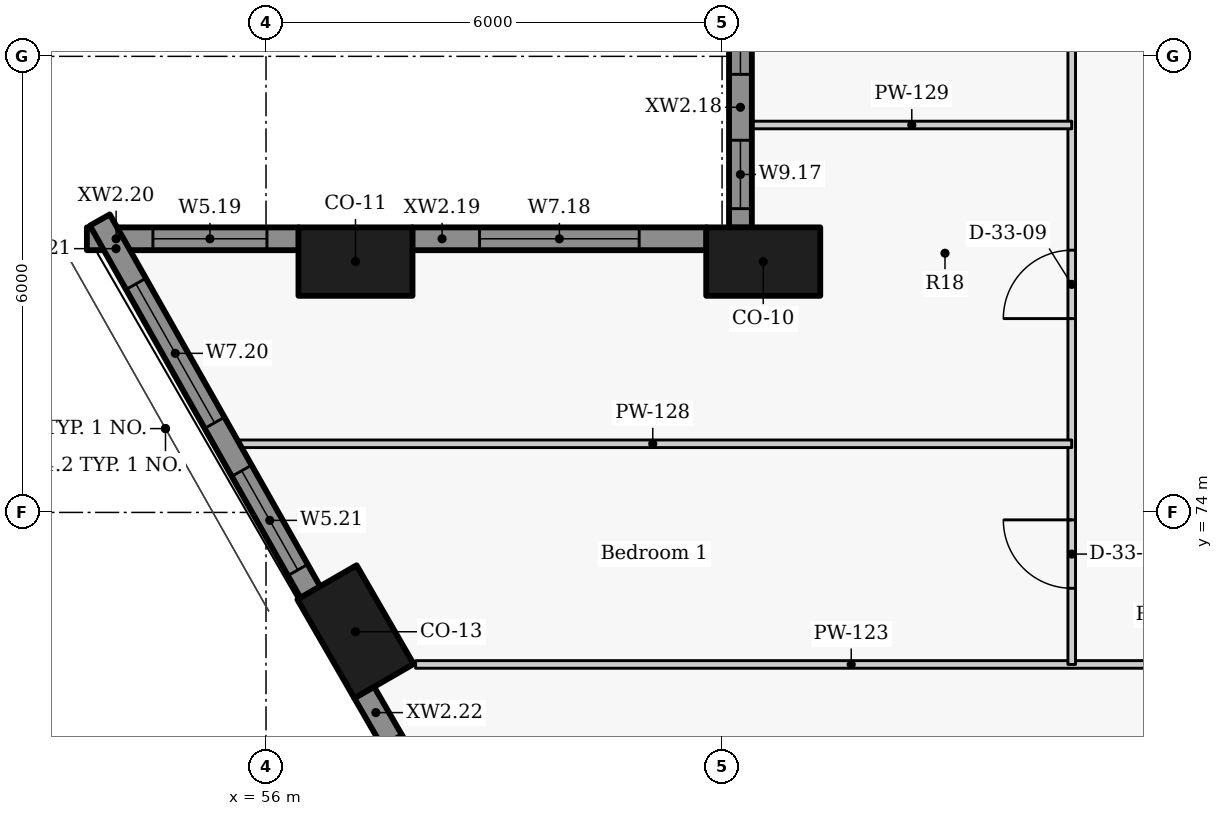
"""IFC4 building model, lengths in metres.
Left out: names, types, materials, properties, quantities, classifications, styles, units other than length and angle.
Written with IfcOpenShell. Run it as: python <this file> out.ifc"""

import sys

from ifc_helpers import new_model, si_unit, direction, frame, frame_2d, origin, origin_2d, place, context, subcontext, project, spatial, rectangle, extrude, element, fill, save


model = new_model("IFC4")
c1 = context("Model", 3, precision=1e-05, world=origin(), true_north=direction((0.0, 1.0)))
c2 = subcontext(c1, "Body", "Model", "MODEL_VIEW")
j1 = project(units=[si_unit("LENGTHUNIT", "METRE"), si_unit("PLANEANGLEUNIT", "RADIAN")], contexts=[c1])
p1 = place(None, origin())
s1 = spatial("IfcSite", under=j1, at=p1, CompositionType="ELEMENT")
p2 = place(p1, origin())
s2 = spatial("IfcBuilding", under=s1, at=p2, CompositionType="ELEMENT")
p3 = place(p2, frame((0.0, 0.0, 51.3)))
s3 = spatial("IfcBuildingStorey", under=s2, at=p3, CompositionType="ELEMENT", Elevation=51.3)
for number, where, z_axis, x_axis in (
    (1, (62.542, 77.3, 0.0), (0.0, 0.0, 1.0), (-1.0, 0.0, 0.0)),
    (2, (57.177, 77.3, 0.0), (0.0, 0.0, 1.0), (-1.0, 0.0, 0.0)),
    (3, (57.177, 72.43, 0.0), (0.0, 0.0, 1.0), (0.5, -0.866, 0.0)),
):
    element("IfcColumn", number, at=place(p3, frame(where, z_axis=z_axis, x_axis=x_axis)), inside=s3, PredefinedType="COLUMN", context=c2, shape_type="SweptSolid", body=[
        extrude(rectangle(XDim=1.5, YDim=0.9, at=origin_2d()), origin(), (0.0, 0.0, 1.0), 3.3),
    ])
p4 = place(p3, frame((62.242, 81.954, 0.0), z_axis=(0.0, 0.0, 1.0), x_axis=(0.0, -1.0, 0.0)))
e4 = element("IfcWall", 4, at=p4, inside=s3, PredefinedType="SOLIDWALL", context=c2, shape_type="SweptSolid", body=[
    extrude(rectangle(XDim=4.208, YDim=0.3, at=frame_2d((2.104, 0.0))), origin(), (0.0, 0.0, 1.0), 2.425),
])
p5 = place(p4, frame((0.691, 0.0, 0.9)))
e5 = element("IfcOpeningElement", 5, at=p5, cuts=e4, PredefinedType="OPENING", context=c2, shape_type="SweptSolid", body=[
    extrude(rectangle(XDim=1.5, YDim=1.1, at=frame_2d((0.75, 0.55))), frame((0.0, 0.16, 0.0), z_axis=(0.0, -1.0, 0.0), x_axis=(1.0, 0.0, 0.0)), (0.0, 0.0, 1.0), 0.32),
])
p6 = place(p4, frame((3.058, 0.0, 0.9)))
e6 = element("IfcOpeningElement", 6, at=p6, cuts=e4, PredefinedType="OPENING", context=c2, shape_type="SweptSolid", body=[
    extrude(rectangle(XDim=0.9, YDim=1.1, at=frame_2d((0.45, 0.55))), frame((0.0, 0.16, 0.0), z_axis=(0.0, -1.0, 0.0), x_axis=(1.0, 0.0, 0.0)), (0.0, 0.0, 1.0), 0.32),
])
p7 = place(p3, frame((61.796, 77.6, 0.0), z_axis=(0.0, 0.0, 1.0), x_axis=(-1.0, 0.0, 0.0)))
e7 = element("IfcWall", 7, at=p7, inside=s3, PredefinedType="SOLIDWALL", context=c2, shape_type="SweptSolid", body=[
    extrude(rectangle(XDim=3.873, YDim=0.3, at=frame_2d((1.936, 0.0))), origin(), (0.0, 0.0, 1.0), 2.425),
])
p8 = place(p7, frame((0.886, 0.0, 0.9)))
e8 = element("IfcOpeningElement", 8, at=p8, cuts=e7, PredefinedType="OPENING", context=c2, shape_type="SweptSolid", body=[
    extrude(rectangle(XDim=2.1, YDim=1.1, at=frame_2d((1.05, 0.55))), frame((0.0, 0.16, 0.0), z_axis=(0.0, -1.0, 0.0), x_axis=(1.0, 0.0, 0.0)), (0.0, 0.0, 1.0), 0.32),
])
p9 = place(p3, frame((56.431, 77.6, 0.0), z_axis=(0.0, 0.0, 1.0), x_axis=(-1.0, 0.0, 0.0)))
e9 = element("IfcWall", 9, at=p9, inside=s3, PredefinedType="SOLIDWALL", context=c2, shape_type="SweptSolid", body=[
    extrude(rectangle(XDim=2.788, YDim=0.3, at=frame_2d((1.394, 0.0))), origin(), (0.0, 0.0, 1.0), 2.425),
])
p10 = place(p9, frame((0.419, 0.0, 0.9)))
e10 = element("IfcOpeningElement", 10, at=p10, cuts=e9, PredefinedType="OPENING", context=c2, shape_type="SweptSolid", body=[
    extrude(rectangle(XDim=1.5, YDim=1.1, at=frame_2d((0.75, 0.55))), frame((0.0, 0.16, 0.0), z_axis=(0.0, -1.0, 0.0), x_axis=(1.0, 0.0, 0.0)), (0.0, 0.0, 1.0), 0.32),
])
p11 = place(p3, frame((53.814, 77.847, 0.0), z_axis=(0.0, 0.0, 1.0), x_axis=(0.492363204642, -0.870389840655, 0.0)))
e11 = element("IfcWall", 11, at=p11, inside=s3, PredefinedType="SOLIDWALL", context=c2, shape_type="SweptSolid", body=[
    extrude(rectangle(XDim=5.626, YDim=0.3, at=frame_2d((2.813, 0.0))), origin(), (0.0, 0.0, 1.0), 2.425),
])
p12 = place(p11, frame((0.965, 0.0, 0.9)))
e12 = element("IfcOpeningElement", 12, at=p12, cuts=e11, PredefinedType="OPENING", context=c2, shape_type="SweptSolid", body=[
    extrude(rectangle(XDim=2.1, YDim=1.1, at=frame_2d((1.05, 0.55))), frame((0.0, 0.16, 0.0), z_axis=(0.0, -1.0, 0.0), x_axis=(1.0, 0.0, 0.0)), (0.0, 0.0, 1.0), 0.32),
])
p13 = place(p11, frame((3.789, 0.0, 0.9)))
e13 = element("IfcOpeningElement", 13, at=p13, cuts=e11, PredefinedType="OPENING", context=c2, shape_type="SweptSolid", body=[
    extrude(rectangle(XDim=1.5, YDim=1.1, at=frame_2d((0.75, 0.55))), frame((0.0, 0.16, 0.0), z_axis=(0.0, -1.0, 0.0), x_axis=(1.0, 0.0, 0.0)), (0.0, 0.0, 1.0), 0.32),
])
p14 = place(p3, frame((57.29, 71.634, 0.0), z_axis=(0.0, 0.0, 1.0), x_axis=(0.499977402622, -0.866038449993, 0.0)))
e14 = element("IfcWall", 14, at=p14, inside=s3, PredefinedType="SOLIDWALL", context=c2, shape_type="SweptSolid", body=[
    extrude(rectangle(XDim=3.537, YDim=0.3, at=frame_2d((1.769, 0.0))), origin(), (0.0, 0.0, 1.0), 2.425),
])
p15 = place(p14, frame((0.719, 0.0, 0.9)))
e15 = element("IfcOpeningElement", 15, at=p15, cuts=e14, PredefinedType="OPENING", context=c2, shape_type="SweptSolid", body=[
    extrude(rectangle(XDim=2.1, YDim=1.1, at=frame_2d((1.05, 0.55))), frame((0.0, 0.16, 0.0), z_axis=(0.0, -1.0, 0.0), x_axis=(1.0, 0.0, 0.0)), (0.0, 0.0, 1.0), 0.32),
])
p16 = place(p3, frame((57.968, 72.0, 0.0), z_axis=(0.0, 0.0, 1.0), x_axis=(1.0, 0.0, 0.0)))
e16 = element("IfcWall", 16, at=p16, inside=s3, PredefinedType="PARTITIONING", context=c2, shape_type="SweptSolid", body=[
    extrude(rectangle(XDim=11.462, YDim=0.1, at=frame_2d((5.731, 0.0))), origin(), (0.0, 0.0, 1.0), 3.025),
])
p17 = place(p3, frame((66.6, 72.0, 0.0), z_axis=(0.0, 0.0, 1.0), x_axis=(0.0, 1.0, 0.0)))
e17 = element("IfcWall", 17, at=p17, inside=s3, PredefinedType="PARTITIONING", context=c2, shape_type="SweptSolid", body=[
    extrude(rectangle(XDim=18.0, YDim=0.1, at=frame_2d((9.0, 0.0))), origin(), (0.0, 0.0, 1.0), 3.025),
])
p18 = place(p17, frame((1.002, 0.0, 0.0)))
e18 = element("IfcOpeningElement", 18, at=p18, cuts=e17, PredefinedType="OPENING", context=c2, shape_type="SweptSolid", body=[
    extrude(rectangle(XDim=0.9, YDim=2.1, at=frame_2d((0.45, 1.05))), frame((0.0, 0.06, 0.0), z_axis=(0.0, -1.0, 0.0), x_axis=(1.0, 0.0, 0.0)), (0.0, 0.0, 1.0), 0.12),
])
p19 = place(p17, frame((4.55, 0.0, 0.0)))
e19 = element("IfcOpeningElement", 19, at=p19, cuts=e17, PredefinedType="OPENING", context=c2, shape_type="SweptSolid", body=[
    extrude(rectangle(XDim=0.9, YDim=2.1, at=frame_2d((0.45, 1.05))), frame((0.0, 0.06, 0.0), z_axis=(0.0, -1.0, 0.0), x_axis=(1.0, 0.0, 0.0)), (0.0, 0.0, 1.0), 0.12),
])
p20 = place(p17, frame((8.098, 0.0, 0.0)))
e20 = element("IfcOpeningElement", 20, at=p20, cuts=e17, PredefinedType="OPENING", context=c2, shape_type="SweptSolid", body=[
    extrude(rectangle(XDim=0.9, YDim=2.1, at=frame_2d((0.45, 1.05))), frame((0.0, 0.06, 0.0), z_axis=(0.0, -1.0, 0.0), x_axis=(1.0, 0.0, 0.0)), (0.0, 0.0, 1.0), 0.12),
])
p21 = place(p17, frame((13.55, 0.0, 0.0)))
e21 = element("IfcOpeningElement", 21, at=p21, cuts=e17, PredefinedType="OPENING", context=c2, shape_type="SweptSolid", body=[
    extrude(rectangle(XDim=0.9, YDim=2.1, at=frame_2d((0.45, 1.05))), frame((0.0, 0.06, 0.0), z_axis=(0.0, -1.0, 0.0), x_axis=(1.0, 0.0, 0.0)), (0.0, 0.0, 1.0), 0.12),
])
p22 = place(p3, frame((55.576, 74.903, 0.0), z_axis=(0.0, 0.0, 1.0), x_axis=(1.0, 0.0, 0.0)))
e22 = element("IfcWall", 22, at=p22, inside=s3, PredefinedType="PARTITIONING", context=c2, shape_type="SweptSolid", body=[
    extrude(rectangle(XDim=11.024, YDim=0.1, at=frame_2d((5.512, 0.0))), origin(), (0.0, 0.0, 1.0), 2.405),
])
p23 = place(p3, frame((62.392, 79.097, 0.0), z_axis=(0.0, 0.0, 1.0), x_axis=(1.0, 0.0, 0.0)))
e23 = element("IfcWall", 23, at=p23, inside=s3, PredefinedType="PARTITIONING", context=c2, shape_type="SweptSolid", body=[
    extrude(rectangle(XDim=4.208, YDim=0.1, at=frame_2d((2.104, 0.0))), origin(), (0.0, 0.0, 1.0), 2.405),
])
p24 = place(p5, origin())
e24 = element("IfcWindow", 24, at=p24, inside=s3, PartitioningType="SINGLE_PANEL", PredefinedType="WINDOW", context=c2, shape_type="SweptSolid", body=[
    extrude(rectangle(XDim=1.5, YDim=1.1, at=frame_2d((0.75, 0.55))), frame((0.0, 0.03, 0.0), z_axis=(0.0, -1.0, 0.0), x_axis=(1.0, 0.0, 0.0)), (0.0, 0.0, 1.0), 0.06),
])
fill(e5, e24)
p25 = place(p6, origin())
e25 = element("IfcWindow", 25, at=p25, inside=s3, PartitioningType="SINGLE_PANEL", PredefinedType="WINDOW", context=c2, shape_type="SweptSolid", body=[
    extrude(rectangle(XDim=0.9, YDim=1.1, at=frame_2d((0.45, 0.55))), frame((0.0, 0.03, 0.0), z_axis=(0.0, -1.0, 0.0), x_axis=(1.0, 0.0, 0.0)), (0.0, 0.0, 1.0), 0.06),
])
fill(e6, e25)
p26 = place(p8, origin())
e26 = element("IfcWindow", 26, at=p26, inside=s3, PartitioningType="SINGLE_PANEL", PredefinedType="WINDOW", context=c2, shape_type="SweptSolid", body=[
    extrude(rectangle(XDim=2.1, YDim=1.1, at=frame_2d((1.05, 0.55))), frame((0.0, 0.03, 0.0), z_axis=(0.0, -1.0, 0.0), x_axis=(1.0, 0.0, 0.0)), (0.0, 0.0, 1.0), 0.06),
])
fill(e8, e26)
p27 = place(p10, origin())
e27 = element("IfcWindow", 27, at=p27, inside=s3, PartitioningType="SINGLE_PANEL", PredefinedType="WINDOW", context=c2, shape_type="SweptSolid", body=[
    extrude(rectangle(XDim=1.5, YDim=1.1, at=frame_2d((0.75, 0.55))), frame((0.0, 0.03, 0.0), z_axis=(0.0, -1.0, 0.0), x_axis=(1.0, 0.0, 0.0)), (0.0, 0.0, 1.0), 0.06),
])
fill(e10, e27)
p28 = place(p12, origin())
e28 = element("IfcWindow", 28, at=p28, inside=s3, PartitioningType="SINGLE_PANEL", PredefinedType="WINDOW", context=c2, shape_type="SweptSolid", body=[
    extrude(rectangle(XDim=2.1, YDim=1.1, at=frame_2d((1.05, 0.55))), frame((0.0, 0.03, 0.0), z_axis=(0.0, -1.0, 0.0), x_axis=(1.0, 0.0, 0.0)), (0.0, 0.0, 1.0), 0.06),
])
fill(e12, e28)
p29 = place(p13, origin())
e29 = element("IfcWindow", 29, at=p29, inside=s3, PartitioningType="SINGLE_PANEL", PredefinedType="WINDOW", context=c2, shape_type="SweptSolid", body=[
    extrude(rectangle(XDim=1.5, YDim=1.1, at=frame_2d((0.75, 0.55))), frame((0.0, 0.03, 0.0), z_axis=(0.0, -1.0, 0.0), x_axis=(1.0, 0.0, 0.0)), (0.0, 0.0, 1.0), 0.06),
])
fill(e13, e29)
p30 = place(p18, origin())
e30 = element("IfcDoor", 30, at=p30, inside=s3, OperationType="SINGLE_SWING_RIGHT", PredefinedType="DOOR", context=c2, shape_type="SweptSolid", body=[
    extrude(rectangle(XDim=0.9, YDim=2.1, at=frame_2d((0.45, 1.05))), frame((0.0, 0.025, 0.0), z_axis=(0.0, -1.0, 0.0), x_axis=(1.0, 0.0, 0.0)), (0.0, 0.0, 1.0), 0.05),
])
fill(e18, e30)
p31 = place(p19, origin())
e31 = element("IfcDoor", 31, at=p31, inside=s3, OperationType="SINGLE_SWING_LEFT", PredefinedType="DOOR", context=c2, shape_type="SweptSolid", body=[
    extrude(rectangle(XDim=0.9, YDim=2.1, at=frame_2d((0.45, 1.05))), frame((0.0, 0.025, 0.0), z_axis=(0.0, -1.0, 0.0), x_axis=(1.0, 0.0, 0.0)), (0.0, 0.0, 1.0), 0.05),
])
fill(e19, e31)
save(model, sys.argv[1])
